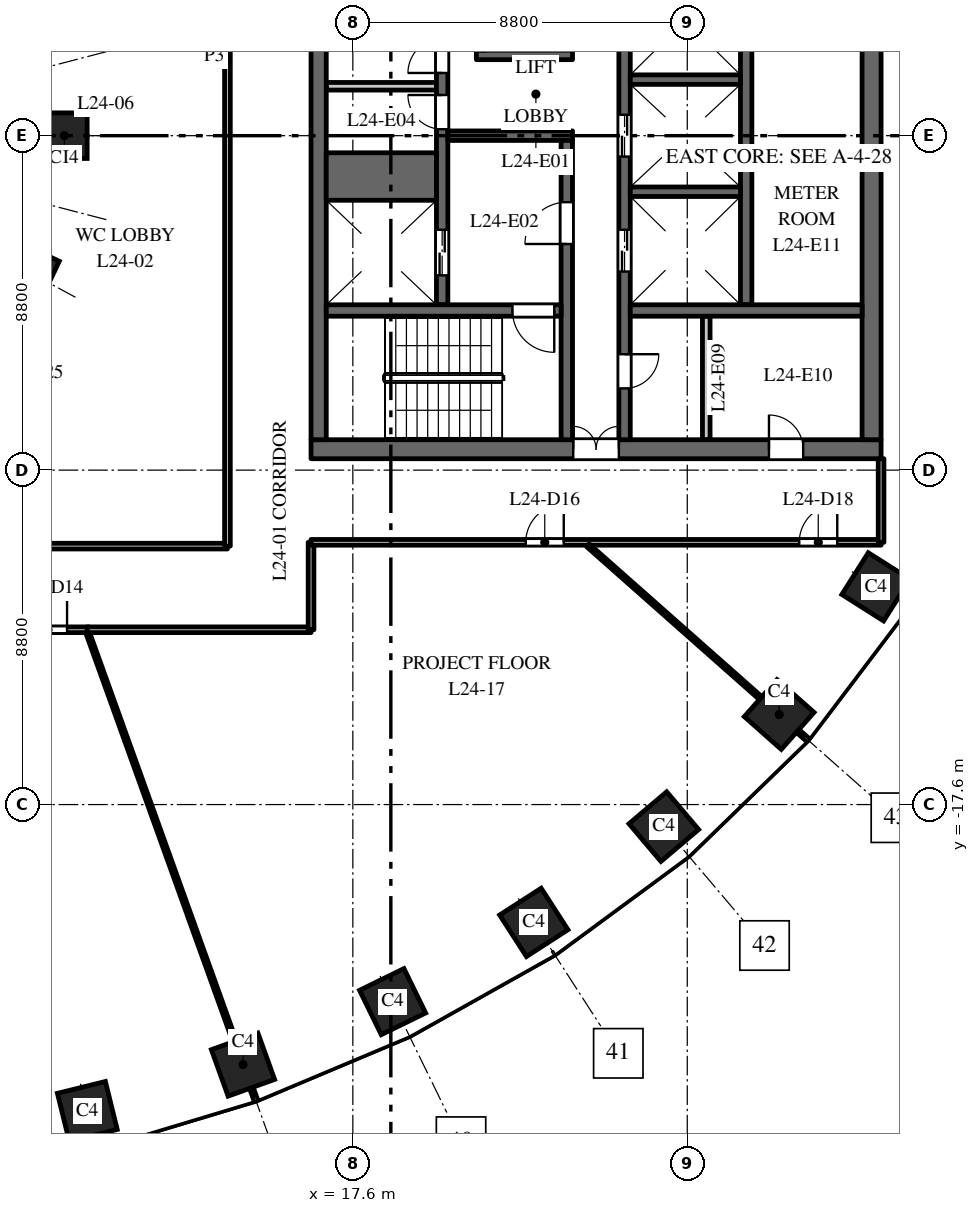
"""IFC4 building model, lengths in metres.
Left out: names, types, materials, properties, quantities, classifications, styles, units other than length and angle.
Written with IfcOpenShell. Run it as: python <this file> out.ifc"""

import sys

from ifc_helpers import new_model, si_unit, direction, frame, frame_2d, origin, origin_2d, place, context, subcontext, project, spatial, rectangle, extrude, element, fill, save


model = new_model("IFC4")
c1 = context("Model", 3, precision=1e-05, world=origin(), true_north=direction((0.0, 1.0)))
c2 = subcontext(c1, "Body", "Model", "MODEL_VIEW")
j1 = project(units=[si_unit("LENGTHUNIT", "METRE"), si_unit("PLANEANGLEUNIT", "RADIAN")], contexts=[c1])
p1 = place(None, origin())
s1 = spatial("IfcSite", under=j1, at=p1, CompositionType="ELEMENT")
p2 = place(p1, origin())
s2 = spatial("IfcBuilding", under=s1, at=p2, CompositionType="ELEMENT")
p3 = place(p2, frame((0.0, 0.0, 108.0)))
s3 = spatial("IfcBuildingStorey", under=s2, at=p3, CompositionType="ELEMENT", Elevation=108.0)
for number, where, z_axis, x_axis in (
    (1, (10.613, -25.674, 0.0), (0.0, 0.0, 1.0), (0.971, 0.24, 0.0)),
    (2, (14.709, -24.441, 0.0), (0.0, 0.0, 1.0), (0.941, 0.338, 0.0)),
    (3, (18.646, -22.785, 0.0), (0.0, 0.0, 1.0), (0.898, 0.439, 0.0)),
    (4, (22.362, -20.7, 0.0), (0.0, 0.0, 1.0), (0.84, 0.542, 0.0)),
    (5, (25.783, -18.18, 0.0), (0.0, 0.0, 1.0), (0.763, 0.646, 0.0)),
    (6, (28.819, -15.23, 0.0), (0.0, 0.0, 1.0), (0.663, 0.749, 0.0)),
    (7, (31.365, -11.871, 0.0), (0.0, 0.0, 1.0), (0.535, 0.845, 0.0)),
):
    element("IfcColumn", number, at=place(p3, frame(where, z_axis=z_axis, x_axis=x_axis)), inside=s3, PredefinedType="COLUMN", context=c2, shape_type="SweptSolid", body=[
        extrude(rectangle(XDim=1.3, YDim=1.3, at=origin_2d()), origin(), (0.0, 0.0, 1.0), 4.0),
    ])
for number, where, z_axis, x_axis in (
    (8, (10.008, 0.0, 0.0), (0.0, 0.0, 1.0), (0.0, 1.0, 0.0)),
    (9, (9.076, -3.588, 0.0), (0.0, 0.0, 1.0), (0.429, 0.903, 0.0)),
):
    element("IfcColumn", number, at=place(p3, frame(where, z_axis=z_axis, x_axis=x_axis)), inside=s3, PredefinedType="COLUMN", context=c2, shape_type="SweptSolid", body=[
        extrude(rectangle(XDim=1.2, YDim=1.2, at=origin_2d()), origin(), (0.0, 0.0, 1.0), 4.0),
    ])
p4 = place(p3, frame((16.5, -8.25, 0.0), z_axis=(0.0, 0.0, 1.0), x_axis=(1.0, 0.0, 0.0)))
e10 = element("IfcWall", 10, at=p4, inside=s3, PredefinedType="SHEAR", context=c2, shape_type="SweptSolid", body=[
    extrude(rectangle(XDim=15.0, YDim=0.5, at=frame_2d((7.5, 0.0))), origin(), (0.0, 0.0, 1.0), 3.7),
])
p5 = place(p4, frame((6.9, 0.0, 0.0)))
e11 = element("IfcOpeningElement", 11, at=p5, cuts=e10, PredefinedType="OPENING", context=c2, shape_type="SweptSolid", body=[
    extrude(rectangle(XDim=1.2, YDim=2.1, at=frame_2d((0.6, 1.05))), frame((0.0, 0.26, 0.0), z_axis=(0.0, -1.0, 0.0), x_axis=(1.0, 0.0, 0.0)), (0.0, 0.0, 1.0), 0.52),
])
p6 = place(p4, frame((12.05, 0.0, 0.0)))
e12 = element("IfcOpeningElement", 12, at=p6, cuts=e10, PredefinedType="OPENING", context=c2, shape_type="SweptSolid", body=[
    extrude(rectangle(XDim=0.9, YDim=2.1, at=frame_2d((0.45, 1.05))), frame((0.0, 0.26, 0.0), z_axis=(0.0, -1.0, 0.0), x_axis=(1.0, 0.0, 0.0)), (0.0, 0.0, 1.0), 0.52),
])
p7 = place(p3, frame((16.9, 1.3, 0.0), z_axis=(0.0, 0.0, 1.0), x_axis=(1.0, 0.0, 0.0)))
e13 = element("IfcWall", 13, at=p7, inside=s3, PredefinedType="PARTITIONING", context=c2, shape_type="SweptSolid", body=[
    extrude(rectangle(XDim=2.9, YDim=0.2, at=frame_2d((1.45, 0.0))), origin(), (0.0, 0.0, 1.0), 3.7),
])
p8 = place(p3, frame((27.95, -4.45, 0.0), z_axis=(0.0, 0.0, 1.0), x_axis=(0.0, 1.0, 0.0)))
e14 = element("IfcWall", 14, at=p8, inside=s3, PredefinedType="SHEAR", context=c2, shape_type="SweptSolid", body=[
    extrude(rectangle(XDim=8.9, YDim=0.3, at=frame_2d((4.45, 0.0))), origin(), (0.0, 0.0, 1.0), 3.7),
])
p9 = place(p3, frame((19.95, -4.45, 0.0), z_axis=(0.0, 0.0, 1.0), x_axis=(0.0, 1.0, 0.0)))
e15 = element("IfcWall", 15, at=p9, inside=s3, PredefinedType="SHEAR", context=c2, shape_type="SweptSolid", body=[
    extrude(rectangle(XDim=8.9, YDim=0.3, at=frame_2d((4.45, 0.0))), origin(), (0.0, 0.0, 1.0), 3.7),
])
p10 = place(p9, frame((0.775, 0.0, 0.0)))
e16 = element("IfcOpeningElement", 16, at=p10, cuts=e15, PredefinedType="OPENING", context=c2, shape_type="SweptSolid", body=[
    extrude(rectangle(XDim=1.2, YDim=2.1, at=frame_2d((0.6, 1.05))), frame((0.0, 0.16, 0.0), z_axis=(0.0, -1.0, 0.0), x_axis=(1.0, 0.0, 0.0)), (0.0, 0.0, 1.0), 0.32),
])
p11 = place(p9, frame((4.62, 0.0, 0.0)))
e17 = element("IfcOpeningElement", 17, at=p11, cuts=e15, PredefinedType="OPENING", context=c2, shape_type="SweptSolid", body=[
    extrude(rectangle(XDim=0.9, YDim=2.1, at=frame_2d((0.45, 1.05))), frame((0.0, 0.16, 0.0), z_axis=(0.0, -1.0, 0.0), x_axis=(1.0, 0.0, 0.0)), (0.0, 0.0, 1.0), 0.32),
])
p12 = place(p9, frame((6.1, 0.0, 0.0)))
e18 = element("IfcOpeningElement", 18, at=p12, cuts=e15, PredefinedType="OPENING", context=c2, shape_type="SweptSolid", body=[
    extrude(rectangle(XDim=0.9, YDim=2.1, at=frame_2d((0.45, 1.05))), frame((0.0, 0.16, 0.0), z_axis=(0.0, -1.0, 0.0), x_axis=(1.0, 0.0, 0.0)), (0.0, 0.0, 1.0), 0.32),
])
p13 = place(p9, frame((7.725, 0.0, 0.0)))
e19 = element("IfcOpeningElement", 19, at=p13, cuts=e15, PredefinedType="OPENING", context=c2, shape_type="SweptSolid", body=[
    extrude(rectangle(XDim=0.9, YDim=2.1, at=frame_2d((0.45, 1.05))), frame((0.0, 0.16, 0.0), z_axis=(0.0, -1.0, 0.0), x_axis=(1.0, 0.0, 0.0)), (0.0, 0.0, 1.0), 0.32),
])
p14 = place(p3, frame((24.75, -8.0, 0.0), z_axis=(0.0, 0.0, 1.0), x_axis=(0.0, 1.0, 0.0)))
e20 = element("IfcWall", 20, at=p14, inside=s3, PredefinedType="SHEAR", context=c2, shape_type="SweptSolid", body=[
    extrude(rectangle(XDim=16.0, YDim=0.3, at=frame_2d((8.0, 0.0))), origin(), (0.0, 0.0, 1.0), 3.7),
])
p15 = place(p14, frame((4.425, 0.0, 0.0)))
e21 = element("IfcOpeningElement", 21, at=p15, cuts=e20, PredefinedType="OPENING", context=c2, shape_type="SweptSolid", body=[
    extrude(rectangle(XDim=1.1, YDim=2.1, at=frame_2d((0.55, 1.05))), frame((0.0, 0.16, 0.0), z_axis=(0.0, -1.0, 0.0), x_axis=(1.0, 0.0, 0.0)), (0.0, 0.0, 1.0), 0.32),
])
p16 = place(p14, frame((7.45, 0.0, 0.0)))
e22 = element("IfcOpeningElement", 22, at=p16, cuts=e20, PredefinedType="OPENING", context=c2, shape_type="SweptSolid", body=[
    extrude(rectangle(XDim=1.1, YDim=2.1, at=frame_2d((0.55, 1.05))), frame((0.0, 0.16, 0.0), z_axis=(0.0, -1.0, 0.0), x_axis=(1.0, 0.0, 0.0)), (0.0, 0.0, 1.0), 0.32),
])
p17 = place(p14, frame((10.425, 0.0, 0.0)))
e23 = element("IfcOpeningElement", 23, at=p17, cuts=e20, PredefinedType="OPENING", context=c2, shape_type="SweptSolid", body=[
    extrude(rectangle(XDim=1.2, YDim=2.1, at=frame_2d((0.6, 1.05))), frame((0.0, 0.16, 0.0), z_axis=(0.0, -1.0, 0.0), x_axis=(1.0, 0.0, 0.0)), (0.0, 0.0, 1.0), 0.32),
])
p18 = place(p14, frame((13.75, 0.0, 0.0)))
e24 = element("IfcOpeningElement", 24, at=p18, cuts=e20, PredefinedType="OPENING", context=c2, shape_type="SweptSolid", body=[
    extrude(rectangle(XDim=0.9, YDim=2.1, at=frame_2d((0.45, 1.05))), frame((0.0, 0.16, 0.0), z_axis=(0.0, -1.0, 0.0), x_axis=(1.0, 0.0, 0.0)), (0.0, 0.0, 1.0), 0.32),
])
p19 = place(p14, frame((1.35, 0.0, 0.0)))
e25 = element("IfcOpeningElement", 25, at=p19, cuts=e20, PredefinedType="OPENING", context=c2, shape_type="SweptSolid", body=[
    extrude(rectangle(XDim=0.9, YDim=2.1, at=frame_2d((0.45, 1.05))), frame((0.0, 0.16, 0.0), z_axis=(0.0, -1.0, 0.0), x_axis=(1.0, 0.0, 0.0)), (0.0, 0.0, 1.0), 0.32),
])
p20 = place(p3, frame((20.1, 0.0, 0.0), z_axis=(0.0, 0.0, 1.0), x_axis=(1.0, 0.0, 0.0)))
e26 = element("IfcWall", 26, at=p20, inside=s3, PredefinedType="SHEAR", context=c2, shape_type="SweptSolid", body=[
    extrude(rectangle(XDim=3.28, YDim=0.25, at=frame_2d((1.64, 0.0))), origin(), (0.0, 0.0, 1.0), 3.7),
])
p21 = place(p3, frame((16.7, -8.0, 0.0), z_axis=(0.0, 0.0, 1.0), x_axis=(0.0, 1.0, 0.0)))
e27 = element("IfcWall", 27, at=p21, inside=s3, PredefinedType="SHEAR", context=c2, shape_type="SweptSolid", body=[
    extrude(rectangle(XDim=16.0, YDim=0.4, at=frame_2d((8.0, 0.0))), origin(), (0.0, 0.0, 1.0), 3.7),
])
p22 = place(p3, frame((31.25, -8.0, 0.0), z_axis=(0.0, 0.0, 1.0), x_axis=(0.0, 1.0, 0.0)))
e28 = element("IfcWall", 28, at=p22, inside=s3, PredefinedType="SHEAR", context=c2, shape_type="SweptSolid", body=[
    extrude(rectangle(XDim=16.0, YDim=0.5, at=frame_2d((8.0, 0.0))), origin(), (0.0, 0.0, 1.0), 3.7),
])
p23 = place(p3, frame((26.9, -8.0, 0.0), z_axis=(0.0, 0.0, 1.0), x_axis=(0.0, 1.0, 0.0)))
e29 = element("IfcWall", 29, at=p23, inside=s3, PredefinedType="PARTITIONING", context=c2, shape_type="SweptSolid", body=[
    extrude(rectangle(XDim=3.25, YDim=0.2, at=frame_2d((1.625, 0.0))), origin(), (0.0, 0.0, 1.0), 3.7),
])
p24 = place(p3, frame((24.9, -4.6, 0.0), z_axis=(0.0, 0.0, 1.0), x_axis=(1.0, 0.0, 0.0)))
e30 = element("IfcWall", 30, at=p24, inside=s3, PredefinedType="SHEAR", context=c2, shape_type="SweptSolid", body=[
    extrude(rectangle(XDim=6.1, YDim=0.3, at=frame_2d((3.05, 0.0))), origin(), (0.0, 0.0, 1.0), 3.7),
])
p25 = place(p3, frame((16.9, -1.075, 0.0), z_axis=(0.0, 0.0, 1.0), x_axis=(1.0, 0.0, 0.0)))
e31 = element("IfcWall", 31, at=p25, inside=s3, PredefinedType="SHEAR", context=c2, shape_type="SweptSolid", body=[
    extrude(rectangle(XDim=2.9, YDim=1.25, at=frame_2d((1.45, 0.0))), origin(), (0.0, 0.0, 1.0), 3.7),
])
for number, where, z_axis, x_axis in (
    (32, (24.9, -1.475, 0.0), (0.0, 0.0, 1.0), (1.0, 0.0, 0.0)),
    (33, (24.9, 1.475, 0.0), (0.0, 0.0, 1.0), (1.0, 0.0, 0.0)),
):
    element("IfcWall", number, at=place(p3, frame(where, z_axis=z_axis, x_axis=x_axis)), inside=s3, PredefinedType="SHEAR", context=c2, shape_type="SweptSolid", body=[
        extrude(rectangle(XDim=2.9, YDim=0.25, at=frame_2d((1.45, 0.0))), origin(), (0.0, 0.0, 1.0), 3.7),
    ])
p26 = place(p3, frame((23.23, -8.0, 0.0), z_axis=(0.0, 0.0, 1.0), x_axis=(0.0, 1.0, 0.0)))
e34 = element("IfcWall", 34, at=p26, inside=s3, PredefinedType="SHEAR", context=c2, shape_type="SweptSolid", body=[
    extrude(rectangle(XDim=7.875, YDim=0.3, at=frame_2d((3.938, 0.0))), origin(), (0.0, 0.0, 1.0), 3.7),
])
p27 = place(p26, frame((5.15, 0.0, 0.0)))
e35 = element("IfcOpeningElement", 35, at=p27, cuts=e34, PredefinedType="OPENING", context=c2, shape_type="SweptSolid", body=[
    extrude(rectangle(XDim=1.1, YDim=2.1, at=frame_2d((0.55, 1.05))), frame((0.0, 0.16, 0.0), z_axis=(0.0, -1.0, 0.0), x_axis=(1.0, 0.0, 0.0)), (0.0, 0.0, 1.0), 0.32),
])
p28 = place(p3, frame((16.9, -4.6, 0.0), z_axis=(0.0, 0.0, 1.0), x_axis=(1.0, 0.0, 0.0)))
e36 = element("IfcWall", 36, at=p28, inside=s3, PredefinedType="SHEAR", context=c2, shape_type="SweptSolid", body=[
    extrude(rectangle(XDim=6.18, YDim=0.3, at=frame_2d((3.09, 0.0))), origin(), (0.0, 0.0, 1.0), 3.7),
])
p29 = place(p28, frame((4.9, 0.0, 0.0)))
e37 = element("IfcOpeningElement", 37, at=p29, cuts=e36, PredefinedType="OPENING", context=c2, shape_type="SweptSolid", body=[
    extrude(rectangle(XDim=1.1, YDim=2.1, at=frame_2d((0.55, 1.05))), frame((0.0, 0.16, 0.0), z_axis=(0.0, -1.0, 0.0), x_axis=(1.0, 0.0, 0.0)), (0.0, 0.0, 1.0), 0.32),
])
p30 = place(p3, frame((20.85, 2.125, 0.0), z_axis=(0.0, 0.0, 1.0), x_axis=(1.0, 0.0, 0.0)))
e38 = element("IfcWall", 38, at=p30, inside=s3, PredefinedType="SHEAR", context=c2, shape_type="SweptSolid", body=[
    extrude(rectangle(XDim=2.53, YDim=0.25, at=frame_2d((1.265, 0.0))), origin(), (0.0, 0.0, 1.0), 3.7),
])
p31 = place(p3, frame((-14.3, -10.8, 0.0), z_axis=(0.0, 0.0, 1.0), x_axis=(1.0, 0.0, 0.0)))
e39 = element("IfcWall", 39, at=p31, inside=s3, PredefinedType="PARTITIONING", context=c2, shape_type="SweptSolid", body=[
    extrude(rectangle(XDim=28.6, YDim=0.15, at=frame_2d((14.3, 0.0))), origin(), (0.0, 0.0, 1.0), 2.85),
])
p32 = place(p31, frame((12.173, 0.0, 0.0)))
e40 = element("IfcOpeningElement", 40, at=p32, cuts=e39, PredefinedType="OPENING", context=c2, shape_type="SweptSolid", body=[
    extrude(rectangle(XDim=1.0, YDim=2.1, at=frame_2d((0.5, 1.05))), frame((0.0, 0.085, 0.0), z_axis=(0.0, -1.0, 0.0), x_axis=(1.0, 0.0, 0.0)), (0.0, 0.0, 1.0), 0.17),
])
p33 = place(p31, frame((16.94, 0.0, 0.0)))
e41 = element("IfcOpeningElement", 41, at=p33, cuts=e39, PredefinedType="OPENING", context=c2, shape_type="SweptSolid", body=[
    extrude(rectangle(XDim=1.0, YDim=2.1, at=frame_2d((0.5, 1.05))), frame((0.0, 0.085, 0.0), z_axis=(0.0, -1.0, 0.0), x_axis=(1.0, 0.0, 0.0)), (0.0, 0.0, 1.0), 0.17),
])
p34 = place(p3, frame((0.68, -13.0, 0.0), z_axis=(0.0, 0.0, 1.0), x_axis=(1.0, 0.0, 0.0)))
e42 = element("IfcWall", 42, at=p34, inside=s3, PredefinedType="PARTITIONING", context=c2, shape_type="SweptSolid", body=[
    extrude(rectangle(XDim=9.968, YDim=0.15, at=frame_2d((4.984, 0.0))), origin(), (0.0, 0.0, 1.0), 2.85),
])
p35 = place(p34, frame((8.4, 0.0, 0.0)))
e43 = element("IfcOpeningElement", 43, at=p35, cuts=e42, PredefinedType="OPENING", context=c2, shape_type="SweptSolid", body=[
    extrude(rectangle(XDim=1.0, YDim=2.1, at=frame_2d((0.5, 1.05))), frame((0.0, 0.085, 0.0), z_axis=(0.0, -1.0, 0.0), x_axis=(1.0, 0.0, 0.0)), (0.0, 0.0, 1.0), 0.17),
])
p36 = place(p3, frame((10.622, -13.075, 0.0), z_axis=(0.0, 0.0, 1.0), x_axis=(0.338388305095, -0.941006564788, 0.0)))
e44 = element("IfcWall", 44, at=p36, inside=s3, PredefinedType="PARTITIONING", context=c2, shape_type="SweptSolid", body=[
    extrude(rectangle(XDim=13.08, YDim=0.1, at=frame_2d((6.54, 0.0))), origin(), (0.0, 0.0, 1.0), 2.85),
])
p37 = place(p3, frame((10.607, -13.0, 0.0), z_axis=(0.0, 0.0, 1.0), x_axis=(1.0, 0.0, 0.0)))
e45 = element("IfcWall", 45, at=p37, inside=s3, PredefinedType="PARTITIONING", context=c2, shape_type="SweptSolid", body=[
    extrude(rectangle(XDim=5.893, YDim=0.15, at=frame_2d((2.947, 0.0))), origin(), (0.0, 0.0, 1.0), 3.7),
])
p38 = place(p3, frame((14.3, -10.8, 0.0), z_axis=(0.0, 0.0, 1.0), x_axis=(0.0, 1.0, 0.0)))
e46 = element("IfcWall", 46, at=p38, inside=s3, PredefinedType="PARTITIONING", context=c2, shape_type="SweptSolid", body=[
    extrude(rectangle(XDim=21.6, YDim=0.15, at=frame_2d((10.8, 0.0))), origin(), (0.0, 0.0, 1.0), 2.75),
])
p39 = place(p38, frame((19.95, 0.0, 0.0)))
e47 = element("IfcOpeningElement", 47, at=p39, cuts=e46, PredefinedType="OPENING", context=c2, shape_type="SweptSolid", body=[
    extrude(rectangle(XDim=1.0, YDim=2.1, at=frame_2d((0.5, 1.05))), frame((0.0, 0.085, 0.0), z_axis=(0.0, -1.0, 0.0), x_axis=(1.0, 0.0, 0.0)), (0.0, 0.0, 1.0), 0.17),
])
p40 = place(p3, frame((16.5, -13.0, 0.0), z_axis=(0.0, 0.0, 1.0), x_axis=(0.0, 1.0, 0.0)))
e48 = element("IfcWall", 48, at=p40, inside=s3, PredefinedType="PARTITIONING", context=c2, shape_type="SweptSolid", body=[
    extrude(rectangle(XDim=2.3, YDim=0.15, at=frame_2d((1.15, 0.0))), origin(), (0.0, 0.0, 1.0), 3.7),
])
p41 = place(p3, frame((16.5, -10.7, 0.0), z_axis=(0.0, 0.0, 1.0), x_axis=(1.0, 0.0, 0.0)))
e49 = element("IfcWall", 49, at=p41, inside=s3, PredefinedType="PARTITIONING", context=c2, shape_type="SweptSolid", body=[
    extrude(rectangle(XDim=15.0, YDim=0.15, at=frame_2d((7.5, 0.0))), origin(), (0.0, 0.0, 1.0), 2.75),
])
p42 = place(p41, frame((5.65, 0.0, 0.0)))
e50 = element("IfcOpeningElement", 50, at=p42, cuts=e49, PredefinedType="OPENING", context=c2, shape_type="SweptSolid", body=[
    extrude(rectangle(XDim=1.0, YDim=2.1, at=frame_2d((0.5, 1.05))), frame((0.0, 0.085, 0.0), z_axis=(0.0, -1.0, 0.0), x_axis=(1.0, 0.0, 0.0)), (0.0, 0.0, 1.0), 0.17),
])
p43 = place(p41, frame((12.847, 0.0, 0.0)))
e51 = element("IfcOpeningElement", 51, at=p43, cuts=e49, PredefinedType="OPENING", context=c2, shape_type="SweptSolid", body=[
    extrude(rectangle(XDim=1.0, YDim=2.1, at=frame_2d((0.5, 1.05))), frame((0.0, 0.085, 0.0), z_axis=(0.0, -1.0, 0.0), x_axis=(1.0, 0.0, 0.0)), (0.0, 0.0, 1.0), 0.17),
])
p44 = place(p3, frame((23.785, -10.778, 0.0), z_axis=(0.0, 0.0, 1.0), x_axis=(0.748985701008, -0.662586160198, 0.0)))
e52 = element("IfcWall", 52, at=p44, inside=s3, PredefinedType="PARTITIONING", context=c2, shape_type="SweptSolid", body=[
    extrude(rectangle(XDim=7.723, YDim=0.1, at=frame_2d((3.861, 0.0))), origin(), (0.0, 0.0, 1.0), 3.7),
])
p45 = place(p3, frame((31.5, -10.7, 0.0), z_axis=(0.0, 0.0, 1.0), x_axis=(0.0, 1.0, 0.0)))
e53 = element("IfcWall", 53, at=p45, inside=s3, PredefinedType="PARTITIONING", context=c2, shape_type="SweptSolid", body=[
    extrude(rectangle(XDim=2.2, YDim=0.15, at=frame_2d((1.1, 0.0))), origin(), (0.0, 0.0, 1.0), 2.9),
])
p46 = place(p10, origin())
e54 = element("IfcDoor", 54, at=p46, inside=s3, OperationType="DOUBLE_DOOR_SLIDING", PredefinedType="DOOR", context=c2, shape_type="SweptSolid", body=[
    extrude(rectangle(XDim=1.2, YDim=2.1, at=frame_2d((0.6, 1.05))), frame((0.0, 0.025, 0.0), z_axis=(0.0, -1.0, 0.0), x_axis=(1.0, 0.0, 0.0)), (0.0, 0.0, 1.0), 0.05),
])
fill(e16, e54)
p47 = place(p15, origin())
e55 = element("IfcDoor", 55, at=p47, inside=s3, OperationType="DOUBLE_DOOR_SLIDING", PredefinedType="DOOR", context=c2, shape_type="SweptSolid", body=[
    extrude(rectangle(XDim=1.1, YDim=2.1, at=frame_2d((0.55, 1.05))), frame((0.0, 0.025, 0.0), z_axis=(0.0, -1.0, 0.0), x_axis=(1.0, 0.0, 0.0)), (0.0, 0.0, 1.0), 0.05),
])
fill(e21, e55)
p48 = place(p16, origin())
e56 = element("IfcDoor", 56, at=p48, inside=s3, OperationType="DOUBLE_DOOR_SLIDING", PredefinedType="DOOR", context=c2, shape_type="SweptSolid", body=[
    extrude(rectangle(XDim=1.1, YDim=2.1, at=frame_2d((0.55, 1.05))), frame((0.0, 0.025, 0.0), z_axis=(0.0, -1.0, 0.0), x_axis=(1.0, 0.0, 0.0)), (0.0, 0.0, 1.0), 0.05),
])
fill(e22, e56)
p49 = place(p29, origin())
e57 = element("IfcDoor", 57, at=p49, inside=s3, OperationType="SINGLE_SWING_RIGHT", PredefinedType="DOOR", context=c2, shape_type="SweptSolid", body=[
    extrude(rectangle(XDim=1.1, YDim=2.1, at=frame_2d((0.55, 1.05))), frame((0.0, 0.025, 0.0), z_axis=(0.0, -1.0, 0.0), x_axis=(1.0, 0.0, 0.0)), (0.0, 0.0, 1.0), 0.05),
])
fill(e37, e57)
p50 = place(p27, origin())
e58 = element("IfcDoor", 58, at=p50, inside=s3, OperationType="SINGLE_SWING_RIGHT", PredefinedType="DOOR", context=c2, shape_type="SweptSolid", body=[
    extrude(rectangle(XDim=1.1, YDim=2.1, at=frame_2d((0.55, 1.05))), frame((0.0, 0.025, 0.0), z_axis=(0.0, -1.0, 0.0), x_axis=(1.0, 0.0, 0.0)), (0.0, 0.0, 1.0), 0.05),
])
fill(e35, e58)
p51 = place(p5, origin())
e59 = element("IfcDoor", 59, at=p51, inside=s3, OperationType="DOUBLE_DOOR_DOUBLE_SWING", PredefinedType="DOOR", context=c2, shape_type="SweptSolid", body=[
    extrude(rectangle(XDim=1.2, YDim=2.1, at=frame_2d((0.6, 1.05))), frame((0.0, 0.025, 0.0), z_axis=(0.0, -1.0, 0.0), x_axis=(1.0, 0.0, 0.0)), (0.0, 0.0, 1.0), 0.05),
])
fill(e11, e59)
p52 = place(p11, origin())
e60 = element("IfcDoor", 60, at=p52, inside=s3, OperationType="SINGLE_SWING_LEFT", PredefinedType="DOOR", context=c2, shape_type="SweptSolid", body=[
    extrude(rectangle(XDim=0.9, YDim=2.1, at=frame_2d((0.45, 1.05))), frame((0.0, 0.025, 0.0), z_axis=(0.0, -1.0, 0.0), x_axis=(1.0, 0.0, 0.0)), (0.0, 0.0, 1.0), 0.05),
])
fill(e17, e60)
p53 = place(p12, origin())
e61 = element("IfcDoor", 61, at=p53, inside=s3, OperationType="SINGLE_SWING_RIGHT", PredefinedType="DOOR", context=c2, shape_type="SweptSolid", body=[
    extrude(rectangle(XDim=0.9, YDim=2.1, at=frame_2d((0.45, 1.05))), frame((0.0, 0.025, 0.0), z_axis=(0.0, -1.0, 0.0), x_axis=(1.0, 0.0, 0.0)), (0.0, 0.0, 1.0), 0.05),
])
fill(e18, e61)
p54 = place(p19, origin())
e62 = element("IfcDoor", 62, at=p54, inside=s3, OperationType="SINGLE_SWING_RIGHT", PredefinedType="DOOR", context=c2, shape_type="SweptSolid", body=[
    extrude(rectangle(XDim=0.9, YDim=2.1, at=frame_2d((0.45, 1.05))), frame((0.0, 0.025, 0.0), z_axis=(0.0, -1.0, 0.0), x_axis=(1.0, 0.0, 0.0)), (0.0, 0.0, 1.0), 0.05),
])
fill(e25, e62)
p55 = place(p6, origin())
e63 = element("IfcDoor", 63, at=p55, inside=s3, OperationType="SINGLE_SWING_RIGHT", PredefinedType="DOOR", context=c2, shape_type="SweptSolid", body=[
    extrude(rectangle(XDim=0.9, YDim=2.1, at=frame_2d((0.45, 1.05))), frame((0.0, 0.025, 0.0), z_axis=(0.0, -1.0, 0.0), x_axis=(1.0, 0.0, 0.0)), (0.0, 0.0, 1.0), 0.05),
])
fill(e12, e63)
p56 = place(p35, origin())
e64 = element("IfcDoor", 64, at=p56, inside=s3, OperationType="SINGLE_SWING_RIGHT", PredefinedType="DOOR", context=c2, shape_type="SweptSolid", body=[
    extrude(rectangle(XDim=1.0, YDim=2.1, at=frame_2d((0.5, 1.05))), frame((0.0, 0.025, 0.0), z_axis=(0.0, -1.0, 0.0), x_axis=(1.0, 0.0, 0.0)), (0.0, 0.0, 1.0), 0.05),
])
fill(e43, e64)
p57 = place(p42, origin())
e65 = element("IfcDoor", 65, at=p57, inside=s3, OperationType="SINGLE_SWING_RIGHT", PredefinedType="DOOR", context=c2, shape_type="SweptSolid", body=[
    extrude(rectangle(XDim=1.0, YDim=2.1, at=frame_2d((0.5, 1.05))), frame((0.0, 0.025, 0.0), z_axis=(0.0, -1.0, 0.0), x_axis=(1.0, 0.0, 0.0)), (0.0, 0.0, 1.0), 0.05),
])
fill(e50, e65)
p58 = place(p43, origin())
e66 = element("IfcDoor", 66, at=p58, inside=s3, OperationType="SINGLE_SWING_RIGHT", PredefinedType="DOOR", context=c2, shape_type="SweptSolid", body=[
    extrude(rectangle(XDim=1.0, YDim=2.1, at=frame_2d((0.5, 1.05))), frame((0.0, 0.025, 0.0), z_axis=(0.0, -1.0, 0.0), x_axis=(1.0, 0.0, 0.0)), (0.0, 0.0, 1.0), 0.05),
])
fill(e51, e66)
save(model, sys.argv[1])
